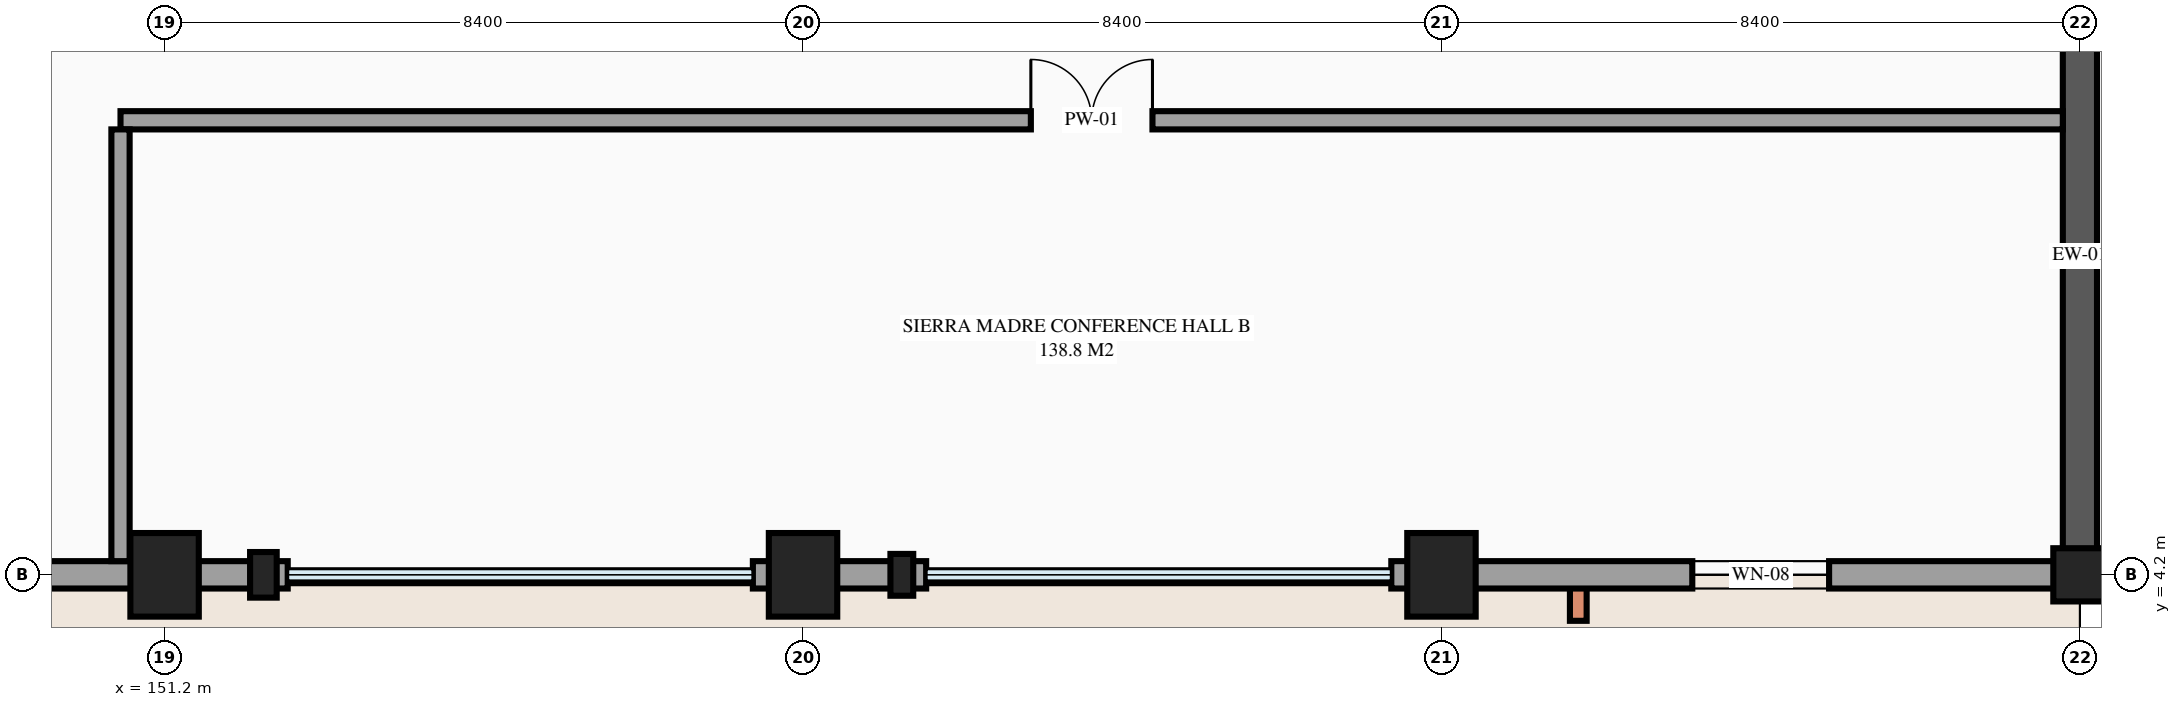
"""IFC4 building model, lengths in metres.
Left out: names, types, materials, properties, quantities, classifications, styles, units other than length and angle.
Written with IfcOpenShell. Run it as: python <this file> out.ifc"""

import sys

from ifc_helpers import new_model, si_unit, direction, frame, frame_2d, origin, origin_2d, place, context, subcontext, project, spatial, rectangle, extrude, element, fill, save


model = new_model("IFC4")
c1 = context("Model", 3, precision=1e-05, world=origin(), true_north=direction((0.0, 1.0)))
c2 = subcontext(c1, "Body", "Model", "MODEL_VIEW")
j1 = project(units=[si_unit("LENGTHUNIT", "METRE"), si_unit("PLANEANGLEUNIT", "RADIAN")], contexts=[c1])
p1 = place(None, origin())
s1 = spatial("IfcSite", under=j1, at=p1, CompositionType="ELEMENT")
p2 = place(p1, origin())
s2 = spatial("IfcBuilding", under=s1, at=p2, CompositionType="ELEMENT")
p3 = place(p2, frame((0.0, 0.0, 9.9)))
s3 = spatial("IfcBuildingStorey", under=s2, at=p3, CompositionType="ELEMENT", Elevation=9.9)
for number, where, z_axis, x_axis in (
    (1, (151.2, 4.2, 0.0), (0.0, 0.0, 1.0), (1.0, 0.0, 0.0)),
    (2, (159.6, 4.2, 0.0), (0.0, 0.0, 1.0), (1.0, 0.0, 0.0)),
    (3, (168.0, 4.2, 0.0), (0.0, 0.0, 1.0), (1.0, 0.0, 0.0)),
):
    element("IfcColumn", number, at=place(p3, frame(where, z_axis=z_axis, x_axis=x_axis)), inside=s3, PredefinedType="COLUMN", context=c2, shape_type="SweptSolid", body=[
        extrude(rectangle(XDim=0.9, YDim=1.1, at=origin_2d()), origin(), (0.0, 0.0, 1.0), 4.2),
    ])
p4 = place(p3, frame((176.4, 4.2, 0.0), z_axis=(0.0, 0.0, 1.0), x_axis=(1.0, 0.0, 0.0)))
e4 = element("IfcColumn", 4, at=p4, inside=s3, PredefinedType="COLUMN", context=c2, shape_type="SweptSolid", body=[
    extrude(rectangle(XDim=0.7, YDim=0.7, at=origin_2d()), origin(), (0.0, 0.0, 1.0), 4.2),
])
p5 = place(p3, frame((152.5, 4.2, 0.0), z_axis=(0.0, 0.0, 1.0), x_axis=(1.0, 0.0, 0.0)))
e5 = element("IfcColumn", 5, at=p5, inside=s3, PredefinedType="PILASTER", context=c2, shape_type="SweptSolid", body=[
    extrude(rectangle(XDim=0.35, YDim=0.6, at=origin_2d()), origin(), (0.0, 0.0, 1.0), 4.2),
])
p6 = place(p3, frame((160.9, 4.2, 0.0), z_axis=(0.0, 0.0, 1.0), x_axis=(1.0, 0.0, 0.0)))
e6 = element("IfcColumn", 6, at=p6, inside=s3, PredefinedType="PILASTER", context=c2, shape_type="SweptSolid", body=[
    extrude(rectangle(XDim=0.3, YDim=0.55, at=origin_2d()), origin(), (0.0, 0.0, 1.0), 4.2),
])
p7 = place(p3, frame((142.8, 4.2, 0.0), z_axis=(0.0, 0.0, 1.0), x_axis=(1.0, 0.0, 0.0)))
e7 = element("IfcWall", 7, at=p7, inside=s3, PredefinedType="STANDARD", context=c2, shape_type="SweptSolid", body=[
    extrude(rectangle(XDim=8.4, YDim=0.36, at=frame_2d((4.2, 0.0))), origin(), (0.0, 0.0, 1.0), 3.713),
])
p8 = place(p7, frame((3.45, 0.0, 0.75)))
e8 = element("IfcOpeningElement", 8, at=p8, cuts=e7, PredefinedType="OPENING", context=c2, shape_type="SweptSolid", body=[
    extrude(rectangle(XDim=1.5, YDim=1.5, at=frame_2d((0.75, 0.75))), frame((0.0, 0.19, 0.0), z_axis=(0.0, -1.0, 0.0), x_axis=(1.0, 0.0, 0.0)), (0.0, 0.0, 1.0), 0.38),
])
p9 = place(p3, frame((151.2, 4.2, 0.0), z_axis=(0.0, 0.0, 1.0), x_axis=(1.0, 0.0, 0.0)))
e9 = element("IfcWall", 9, at=p9, inside=s3, PredefinedType="STANDARD", context=c2, shape_type="SweptSolid", body=[
    extrude(rectangle(XDim=1.62, YDim=0.36, at=frame_2d((0.81, 0.0))), origin(), (0.0, 0.0, 1.0), 3.276),
])
p10 = place(p3, frame((158.94, 4.2, 0.0), z_axis=(0.0, 0.0, 1.0), x_axis=(1.0, 0.0, 0.0)))
e10 = element("IfcWall", 10, at=p10, inside=s3, PredefinedType="STANDARD", context=c2, shape_type="SweptSolid", body=[
    extrude(rectangle(XDim=0.66, YDim=0.36, at=frame_2d((0.33, 0.0))), origin(), (0.0, 0.0, 1.0), 4.2),
])
p11 = place(p3, frame((159.6, 4.2, 0.0), z_axis=(0.0, 0.0, 1.0), x_axis=(1.0, 0.0, 0.0)))
e11 = element("IfcWall", 11, at=p11, inside=s3, PredefinedType="STANDARD", context=c2, shape_type="SweptSolid", body=[
    extrude(rectangle(XDim=1.62, YDim=0.36, at=frame_2d((0.81, 0.0))), origin(), (0.0, 0.0, 1.0), 3.11),
])
p12 = place(p3, frame((167.34, 4.2, 0.0), z_axis=(0.0, 0.0, 1.0), x_axis=(1.0, 0.0, 0.0)))
e12 = element("IfcWall", 12, at=p12, inside=s3, PredefinedType="STANDARD", context=c2, shape_type="SweptSolid", body=[
    extrude(rectangle(XDim=0.66, YDim=0.36, at=frame_2d((0.33, 0.0))), origin(), (0.0, 0.0, 1.0), 4.2),
])
p13 = place(p3, frame((168.0, 4.2, 0.0), z_axis=(0.0, 0.0, 1.0), x_axis=(1.0, 0.0, 0.0)))
e13 = element("IfcWall", 13, at=p13, inside=s3, PredefinedType="STANDARD", context=c2, shape_type="SweptSolid", body=[
    extrude(rectangle(XDim=8.4, YDim=0.36, at=frame_2d((4.2, 0.0))), origin(), (0.0, 0.0, 1.0), 3.46),
])
p14 = place(p13, frame((3.3, 0.0, 0.75)))
e14 = element("IfcOpeningElement", 14, at=p14, cuts=e13, PredefinedType="OPENING", context=c2, shape_type="SweptSolid", body=[
    extrude(rectangle(XDim=1.8, YDim=1.5, at=frame_2d((0.9, 0.75))), frame((0.0, 0.19, 0.0), z_axis=(0.0, -1.0, 0.0), x_axis=(1.0, 0.0, 0.0)), (0.0, 0.0, 1.0), 0.38),
])
p15 = place(p3, frame((176.4, 4.2, 0.0), z_axis=(0.0, 0.0, 1.0), x_axis=(0.0, 1.0, 0.0)))
e15 = element("IfcWall", 15, at=p15, inside=s3, PredefinedType="STANDARD", context=c2, shape_type="SweptSolid", body=[
    extrude(rectangle(XDim=8.4, YDim=0.45, at=frame_2d((4.2, 0.0))), origin(), (0.0, 0.0, 1.0), 4.2),
])
p16 = place(p3, frame((150.62, 10.18, 0.0), z_axis=(0.0, 0.0, 1.0), x_axis=(1.0, 0.0, 0.0)))
e16 = element("IfcWall", 16, at=p16, inside=s3, PredefinedType="PARTITIONING", context=c2, shape_type="SweptSolid", body=[
    extrude(rectangle(XDim=25.555, YDim=0.24, at=frame_2d((12.777, 0.0))), origin(), (0.0, 0.0, 1.0), 3.955),
])
p17 = place(p16, frame((11.978, 0.0, 0.0)))
e17 = element("IfcOpeningElement", 17, at=p17, cuts=e16, PredefinedType="OPENING", context=c2, shape_type="SweptSolid", body=[
    extrude(rectangle(XDim=1.6, YDim=2.25, at=frame_2d((0.8, 1.125))), frame((0.0, 0.13, 0.0), z_axis=(0.0, -1.0, 0.0), x_axis=(1.0, 0.0, 0.0)), (0.0, 0.0, 1.0), 0.26),
])
p18 = place(p3, frame((150.62, 4.38, 0.0), z_axis=(0.0, 0.0, 1.0), x_axis=(0.0, 1.0, 0.0)))
e18 = element("IfcWall", 18, at=p18, inside=s3, PredefinedType="PARTITIONING", context=c2, shape_type="SweptSolid", body=[
    extrude(rectangle(XDim=5.68, YDim=0.24, at=frame_2d((2.84, 0.0))), origin(), (0.0, 0.0, 1.0), 3.955),
])
p19 = place(p14, origin())
e19 = element("IfcWindow", 19, at=p19, inside=s3, PartitioningType="SINGLE_PANEL", PredefinedType="WINDOW", context=c2, shape_type="SweptSolid", body=[
    extrude(rectangle(XDim=1.8, YDim=1.5, at=frame_2d((0.9, 0.75))), frame((0.0, 0.03, 0.0), z_axis=(0.0, -1.0, 0.0), x_axis=(1.0, 0.0, 0.0)), (0.0, 0.0, 1.0), 0.06),
])
fill(e14, e19)
p20 = place(p17, origin())
e20 = element("IfcDoor", 20, at=p20, inside=s3, OperationType="DOUBLE_DOOR_SINGLE_SWING", PredefinedType="DOOR", context=c2, shape_type="SweptSolid", body=[
    extrude(rectangle(XDim=1.6, YDim=2.25, at=frame_2d((0.8, 1.125))), frame((0.0, 0.025, 0.0), z_axis=(0.0, -1.0, 0.0), x_axis=(1.0, 0.0, 0.0)), (0.0, 0.0, 1.0), 0.05),
])
fill(e17, e20)
save(model, sys.argv[1])
